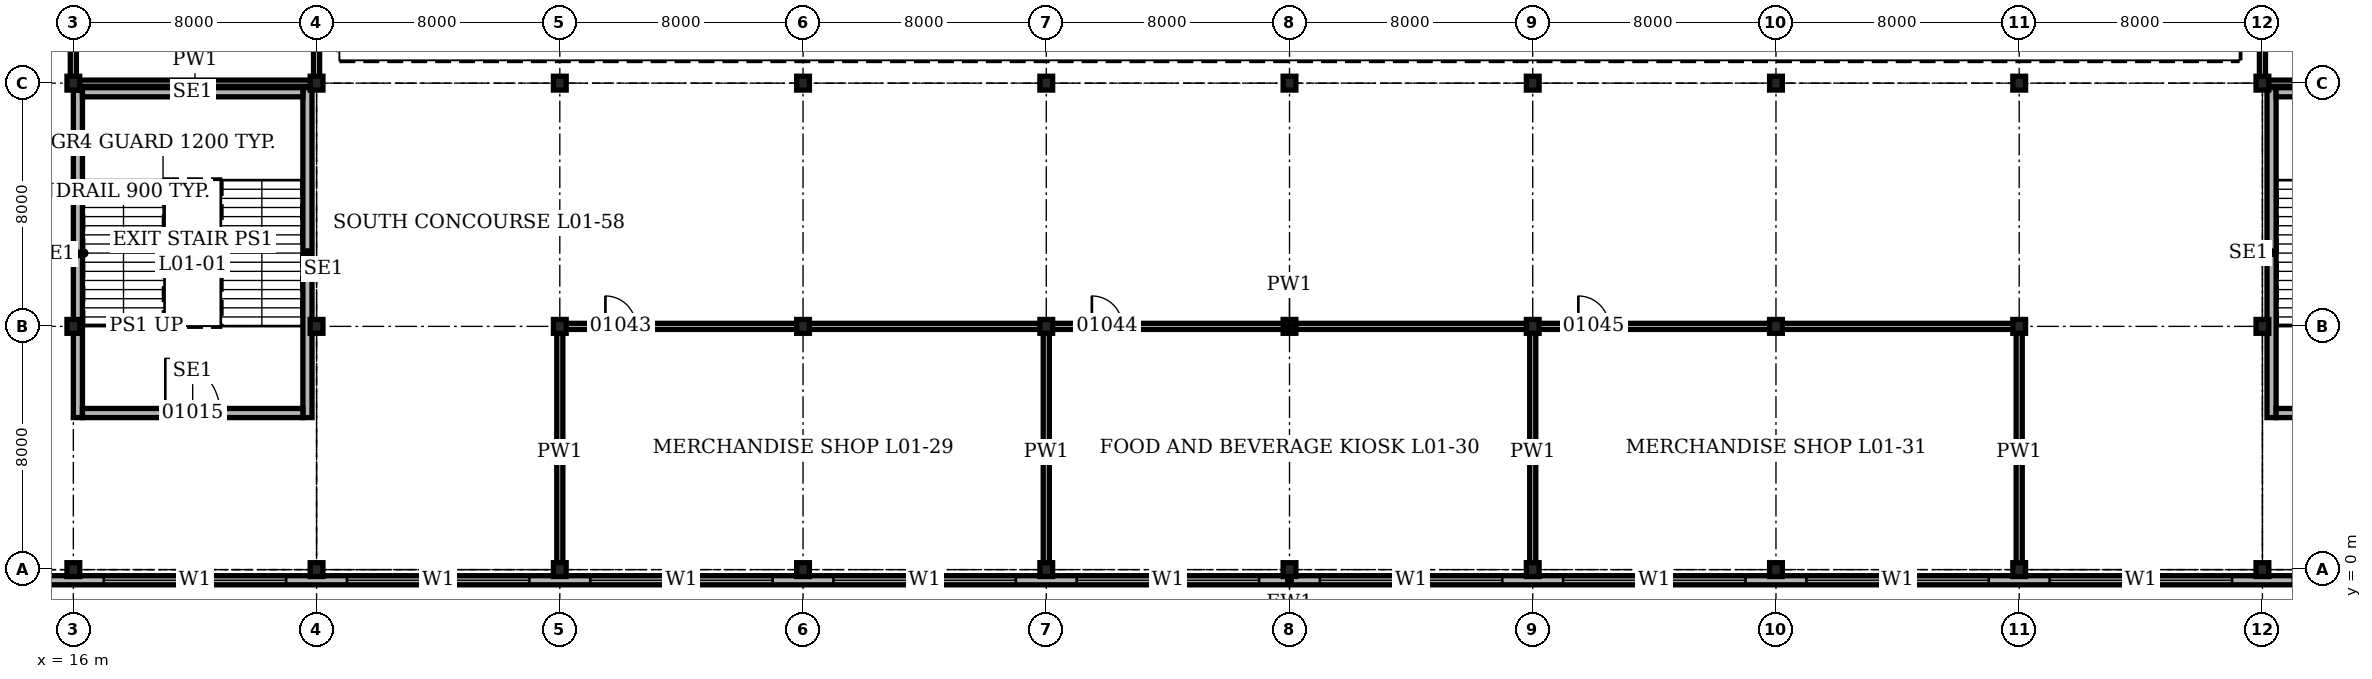
"""IFC4 building model, lengths in metres.
Left out: names, types, materials, properties, quantities, classifications, styles, units other than length and angle.
Written with IfcOpenShell. Run it as: python <this file> out.ifc"""

import sys

from ifc_helpers import new_model, si_unit, direction, frame, frame_2d, origin, origin_2d, place, context, subcontext, project, spatial, rectangle, i_section, extrude, element, fill, save


model = new_model("IFC4")
c1 = context("Model", 3, precision=1e-05, world=origin(), true_north=direction((0.0, 1.0)))
c2 = subcontext(c1, "Body", "Model", "MODEL_VIEW")
j1 = project(units=[si_unit("LENGTHUNIT", "METRE"), si_unit("PLANEANGLEUNIT", "RADIAN")], contexts=[c1])
p1 = place(None, origin())
s1 = spatial("IfcSite", under=j1, at=p1, CompositionType="ELEMENT")
p2 = place(p1, origin())
s2 = spatial("IfcBuilding", under=s1, at=p2, CompositionType="ELEMENT")
p3 = place(p2, frame((0.0, 0.0, 4.9)))
s3 = spatial("IfcBuildingStorey", under=s2, at=p3, CompositionType="ELEMENT", Elevation=4.9)
for number, where, z_axis, x_axis in (
    (1, (16.0, 0.0, 0.0), (0.0, 0.0, 1.0), (1.0, 0.0, 0.0)),
    (2, (16.0, 8.0, 0.0), (0.0, 0.0, 1.0), (1.0, 0.0, 0.0)),
    (3, (16.0, 16.0, 0.0), (0.0, 0.0, 1.0), (1.0, 0.0, 0.0)),
    (4, (24.0, 0.0, 0.0), (0.0, 0.0, 1.0), (1.0, 0.0, 0.0)),
    (5, (24.0, 8.0, 0.0), (0.0, 0.0, 1.0), (1.0, 0.0, 0.0)),
    (6, (24.0, 16.0, 0.0), (0.0, 0.0, 1.0), (1.0, 0.0, 0.0)),
    (7, (32.0, 0.0, 0.0), (0.0, 0.0, 1.0), (1.0, 0.0, 0.0)),
    (8, (32.0, 8.0, 0.0), (0.0, 0.0, 1.0), (1.0, 0.0, 0.0)),
    (9, (32.0, 16.0, 0.0), (0.0, 0.0, 1.0), (1.0, 0.0, 0.0)),
    (10, (40.0, 0.0, 0.0), (0.0, 0.0, 1.0), (1.0, 0.0, 0.0)),
    (11, (40.0, 8.0, 0.0), (0.0, 0.0, 1.0), (1.0, 0.0, 0.0)),
    (12, (40.0, 16.0, 0.0), (0.0, 0.0, 1.0), (1.0, 0.0, 0.0)),
    (13, (48.0, 0.0, 0.0), (0.0, 0.0, 1.0), (1.0, 0.0, 0.0)),
    (14, (48.0, 8.0, 0.0), (0.0, 0.0, 1.0), (1.0, 0.0, 0.0)),
    (15, (48.0, 16.0, 0.0), (0.0, 0.0, 1.0), (1.0, 0.0, 0.0)),
    (16, (56.0, 0.0, 0.0), (0.0, 0.0, 1.0), (1.0, 0.0, 0.0)),
    (17, (56.0, 8.0, 0.0), (0.0, 0.0, 1.0), (1.0, 0.0, 0.0)),
    (18, (56.0, 16.0, 0.0), (0.0, 0.0, 1.0), (1.0, 0.0, 0.0)),
    (19, (64.0, 0.0, 0.0), (0.0, 0.0, 1.0), (1.0, 0.0, 0.0)),
    (20, (64.0, 8.0, 0.0), (0.0, 0.0, 1.0), (1.0, 0.0, 0.0)),
    (21, (64.0, 16.0, 0.0), (0.0, 0.0, 1.0), (1.0, 0.0, 0.0)),
    (22, (72.0, 0.0, 0.0), (0.0, 0.0, 1.0), (1.0, 0.0, 0.0)),
    (23, (72.0, 8.0, 0.0), (0.0, 0.0, 1.0), (1.0, 0.0, 0.0)),
    (24, (72.0, 16.0, 0.0), (0.0, 0.0, 1.0), (1.0, 0.0, 0.0)),
    (25, (80.0, 0.0, 0.0), (0.0, 0.0, 1.0), (1.0, 0.0, 0.0)),
    (26, (80.0, 8.0, 0.0), (0.0, 0.0, 1.0), (1.0, 0.0, 0.0)),
    (27, (80.0, 16.0, 0.0), (0.0, 0.0, 1.0), (1.0, 0.0, 0.0)),
    (28, (88.0, 0.0, 0.0), (0.0, 0.0, 1.0), (1.0, 0.0, 0.0)),
    (29, (88.0, 8.0, 0.0), (0.0, 0.0, 1.0), (1.0, 0.0, 0.0)),
    (30, (88.0, 16.0, 0.0), (0.0, 0.0, 1.0), (1.0, 0.0, 0.0)),
):
    element("IfcColumn", number, at=place(p3, frame(where, z_axis=z_axis, x_axis=x_axis)), inside=s3, PredefinedType="COLUMN", context=c2, shape_type="SweptSolid", body=[
        extrude(i_section(OverallWidth=0.419, OverallDepth=0.455, WebThickness=0.042, FlangeThickness=0.068, at=origin_2d()), origin(), (0.0, 0.0, 1.0), 5.0),
    ])
p4 = place(p3, frame((-0.35, -0.35, 0.0), z_axis=(0.0, 0.0, 1.0), x_axis=(1.0, 0.0, 0.0)))
e31 = element("IfcWall", 31, at=p4, inside=s3, PredefinedType="SOLIDWALL", context=c2, shape_type="SweptSolid", body=[
    extrude(rectangle(XDim=112.7, YDim=0.3, at=frame_2d((56.35, 0.0))), origin(), (0.0, 0.0, 1.0), 5.0),
])
p5 = place(p4, frame((1.35, 0.0, 1.0)))
e32 = element("IfcOpeningElement", 32, at=p5, cuts=e31, PredefinedType="OPENING", context=c2, shape_type="SweptSolid", body=[
    extrude(rectangle(XDim=6.0, YDim=1.5, at=frame_2d((3.0, 0.75))), frame((0.0, 0.16, 0.0), z_axis=(0.0, -1.0, 0.0), x_axis=(1.0, 0.0, 0.0)), (0.0, 0.0, 1.0), 0.32),
])
p6 = place(p4, frame((9.35, 0.0, 1.0)))
e33 = element("IfcOpeningElement", 33, at=p6, cuts=e31, PredefinedType="OPENING", context=c2, shape_type="SweptSolid", body=[
    extrude(rectangle(XDim=6.0, YDim=1.5, at=frame_2d((3.0, 0.75))), frame((0.0, 0.16, 0.0), z_axis=(0.0, -1.0, 0.0), x_axis=(1.0, 0.0, 0.0)), (0.0, 0.0, 1.0), 0.32),
])
p7 = place(p4, frame((17.35, 0.0, 1.0)))
e34 = element("IfcOpeningElement", 34, at=p7, cuts=e31, PredefinedType="OPENING", context=c2, shape_type="SweptSolid", body=[
    extrude(rectangle(XDim=6.0, YDim=1.5, at=frame_2d((3.0, 0.75))), frame((0.0, 0.16, 0.0), z_axis=(0.0, -1.0, 0.0), x_axis=(1.0, 0.0, 0.0)), (0.0, 0.0, 1.0), 0.32),
])
p8 = place(p4, frame((25.35, 0.0, 1.0)))
e35 = element("IfcOpeningElement", 35, at=p8, cuts=e31, PredefinedType="OPENING", context=c2, shape_type="SweptSolid", body=[
    extrude(rectangle(XDim=6.0, YDim=1.5, at=frame_2d((3.0, 0.75))), frame((0.0, 0.16, 0.0), z_axis=(0.0, -1.0, 0.0), x_axis=(1.0, 0.0, 0.0)), (0.0, 0.0, 1.0), 0.32),
])
p9 = place(p4, frame((33.35, 0.0, 1.0)))
e36 = element("IfcOpeningElement", 36, at=p9, cuts=e31, PredefinedType="OPENING", context=c2, shape_type="SweptSolid", body=[
    extrude(rectangle(XDim=6.0, YDim=1.5, at=frame_2d((3.0, 0.75))), frame((0.0, 0.16, 0.0), z_axis=(0.0, -1.0, 0.0), x_axis=(1.0, 0.0, 0.0)), (0.0, 0.0, 1.0), 0.32),
])
p10 = place(p4, frame((41.35, 0.0, 1.0)))
e37 = element("IfcOpeningElement", 37, at=p10, cuts=e31, PredefinedType="OPENING", context=c2, shape_type="SweptSolid", body=[
    extrude(rectangle(XDim=6.0, YDim=1.5, at=frame_2d((3.0, 0.75))), frame((0.0, 0.16, 0.0), z_axis=(0.0, -1.0, 0.0), x_axis=(1.0, 0.0, 0.0)), (0.0, 0.0, 1.0), 0.32),
])
p11 = place(p4, frame((49.35, 0.0, 1.0)))
e38 = element("IfcOpeningElement", 38, at=p11, cuts=e31, PredefinedType="OPENING", context=c2, shape_type="SweptSolid", body=[
    extrude(rectangle(XDim=6.0, YDim=1.5, at=frame_2d((3.0, 0.75))), frame((0.0, 0.16, 0.0), z_axis=(0.0, -1.0, 0.0), x_axis=(1.0, 0.0, 0.0)), (0.0, 0.0, 1.0), 0.32),
])
p12 = place(p4, frame((57.35, 0.0, 1.0)))
e39 = element("IfcOpeningElement", 39, at=p12, cuts=e31, PredefinedType="OPENING", context=c2, shape_type="SweptSolid", body=[
    extrude(rectangle(XDim=6.0, YDim=1.5, at=frame_2d((3.0, 0.75))), frame((0.0, 0.16, 0.0), z_axis=(0.0, -1.0, 0.0), x_axis=(1.0, 0.0, 0.0)), (0.0, 0.0, 1.0), 0.32),
])
p13 = place(p4, frame((65.35, 0.0, 1.0)))
e40 = element("IfcOpeningElement", 40, at=p13, cuts=e31, PredefinedType="OPENING", context=c2, shape_type="SweptSolid", body=[
    extrude(rectangle(XDim=6.0, YDim=1.5, at=frame_2d((3.0, 0.75))), frame((0.0, 0.16, 0.0), z_axis=(0.0, -1.0, 0.0), x_axis=(1.0, 0.0, 0.0)), (0.0, 0.0, 1.0), 0.32),
])
p14 = place(p4, frame((73.35, 0.0, 1.0)))
e41 = element("IfcOpeningElement", 41, at=p14, cuts=e31, PredefinedType="OPENING", context=c2, shape_type="SweptSolid", body=[
    extrude(rectangle(XDim=6.0, YDim=1.5, at=frame_2d((3.0, 0.75))), frame((0.0, 0.16, 0.0), z_axis=(0.0, -1.0, 0.0), x_axis=(1.0, 0.0, 0.0)), (0.0, 0.0, 1.0), 0.32),
])
p15 = place(p4, frame((81.35, 0.0, 1.0)))
e42 = element("IfcOpeningElement", 42, at=p15, cuts=e31, PredefinedType="OPENING", context=c2, shape_type="SweptSolid", body=[
    extrude(rectangle(XDim=6.0, YDim=1.5, at=frame_2d((3.0, 0.75))), frame((0.0, 0.16, 0.0), z_axis=(0.0, -1.0, 0.0), x_axis=(1.0, 0.0, 0.0)), (0.0, 0.0, 1.0), 0.32),
])
p16 = place(p4, frame((89.35, 0.0, 1.0)))
e43 = element("IfcOpeningElement", 43, at=p16, cuts=e31, PredefinedType="OPENING", context=c2, shape_type="SweptSolid", body=[
    extrude(rectangle(XDim=6.0, YDim=1.5, at=frame_2d((3.0, 0.75))), frame((0.0, 0.16, 0.0), z_axis=(0.0, -1.0, 0.0), x_axis=(1.0, 0.0, 0.0)), (0.0, 0.0, 1.0), 0.32),
])
p17 = place(p4, frame((97.35, 0.0, 1.0)))
e44 = element("IfcOpeningElement", 44, at=p17, cuts=e31, PredefinedType="OPENING", context=c2, shape_type="SweptSolid", body=[
    extrude(rectangle(XDim=6.0, YDim=1.5, at=frame_2d((3.0, 0.75))), frame((0.0, 0.16, 0.0), z_axis=(0.0, -1.0, 0.0), x_axis=(1.0, 0.0, 0.0)), (0.0, 0.0, 1.0), 0.32),
])
p18 = place(p4, frame((105.35, 0.0, 1.0)))
e45 = element("IfcOpeningElement", 45, at=p18, cuts=e31, PredefinedType="OPENING", context=c2, shape_type="SweptSolid", body=[
    extrude(rectangle(XDim=6.0, YDim=1.5, at=frame_2d((3.0, 0.75))), frame((0.0, 0.16, 0.0), z_axis=(0.0, -1.0, 0.0), x_axis=(1.0, 0.0, 0.0)), (0.0, 0.0, 1.0), 0.32),
])
p19 = place(p3, frame((16.15, 5.0, 0.0), z_axis=(0.0, 0.0, 1.0), x_axis=(0.0, 1.0, 0.0)))
e46 = element("IfcWall", 46, at=p19, inside=s3, PredefinedType="SOLIDWALL", context=c2, shape_type="SweptSolid", body=[
    extrude(rectangle(XDim=10.773, YDim=0.3, at=frame_2d((5.386, 0.0))), origin(), (0.0, 0.0, 1.0), 4.8),
])
p20 = place(p3, frame((23.7, 5.0, 0.0), z_axis=(0.0, 0.0, 1.0), x_axis=(0.0, 1.0, 0.0)))
e47 = element("IfcWall", 47, at=p20, inside=s3, PredefinedType="SOLIDWALL", context=c2, shape_type="SweptSolid", body=[
    extrude(rectangle(XDim=10.85, YDim=0.3, at=frame_2d((5.425, 0.0))), origin(), (0.0, 0.0, 1.0), 4.8),
])
p21 = place(p3, frame((16.3, 5.15, 0.0), z_axis=(0.0, 0.0, 1.0), x_axis=(1.0, 0.0, 0.0)))
e48 = element("IfcWall", 48, at=p21, inside=s3, PredefinedType="SOLIDWALL", context=c2, shape_type="SweptSolid", body=[
    extrude(rectangle(XDim=7.25, YDim=0.3, at=frame_2d((3.625, 0.0))), origin(), (0.0, 0.0, 1.0), 4.8),
])
p22 = place(p21, frame((2.725, 0.0, 0.0)))
e49 = element("IfcOpeningElement", 49, at=p22, cuts=e48, PredefinedType="OPENING", context=c2, shape_type="SweptSolid", body=[
    extrude(rectangle(XDim=1.8, YDim=2.1, at=frame_2d((0.9, 1.05))), frame((0.0, 0.16, 0.0), z_axis=(0.0, -1.0, 0.0), x_axis=(1.0, 0.0, 0.0)), (0.0, 0.0, 1.0), 0.32),
])
p23 = place(p3, frame((16.3, 15.7, 0.0), z_axis=(0.0, 0.0, 1.0), x_axis=(1.0, 0.0, 0.0)))
e50 = element("IfcWall", 50, at=p23, inside=s3, PredefinedType="SOLIDWALL", context=c2, shape_type="SweptSolid", body=[
    extrude(rectangle(XDim=7.25, YDim=0.3, at=frame_2d((3.625, 0.0))), origin(), (0.0, 0.0, 1.0), 4.8),
])
p24 = place(p3, frame((88.3, 5.0, 0.0), z_axis=(0.0, 0.0, 1.0), x_axis=(0.0, 1.0, 0.0)))
e51 = element("IfcWall", 51, at=p24, inside=s3, PredefinedType="SOLIDWALL", context=c2, shape_type="SweptSolid", body=[
    extrude(rectangle(XDim=10.85, YDim=0.3, at=frame_2d((5.425, 0.0))), origin(), (0.0, 0.0, 1.0), 4.8),
])
p25 = place(p3, frame((88.45, 5.15, 0.0), z_axis=(0.0, 0.0, 1.0), x_axis=(1.0, 0.0, 0.0)))
e52 = element("IfcWall", 52, at=p25, inside=s3, PredefinedType="SOLIDWALL", context=c2, shape_type="SweptSolid", body=[
    extrude(rectangle(XDim=7.25, YDim=0.3, at=frame_2d((3.625, 0.0))), origin(), (0.0, 0.0, 1.0), 4.8),
])
p26 = place(p25, frame((2.725, 0.0, 0.0)))
e53 = element("IfcOpeningElement", 53, at=p26, cuts=e52, PredefinedType="OPENING", context=c2, shape_type="SweptSolid", body=[
    extrude(rectangle(XDim=1.8, YDim=2.1, at=frame_2d((0.9, 1.05))), frame((0.0, 0.16, 0.0), z_axis=(0.0, -1.0, 0.0), x_axis=(1.0, 0.0, 0.0)), (0.0, 0.0, 1.0), 0.32),
])
p27 = place(p3, frame((88.45, 15.7, 0.0), z_axis=(0.0, 0.0, 1.0), x_axis=(1.0, 0.0, 0.0)))
e54 = element("IfcWall", 54, at=p27, inside=s3, PredefinedType="SOLIDWALL", context=c2, shape_type="SweptSolid", body=[
    extrude(rectangle(XDim=7.25, YDim=0.3, at=frame_2d((3.625, 0.0))), origin(), (0.0, 0.0, 1.0), 4.8),
])
p28 = place(p3, frame((32.1, 8.0, 0.0), z_axis=(0.0, 0.0, 1.0), x_axis=(1.0, 0.0, 0.0)))
e55 = element("IfcWall", 55, at=p28, inside=s3, PredefinedType="PARTITIONING", context=c2, shape_type="SweptSolid", body=[
    extrude(rectangle(XDim=47.8, YDim=0.2, at=frame_2d((23.9, 0.0))), origin(), (0.0, 0.0, 1.0), 4.028),
])
p29 = place(p28, frame((1.4, 0.0, 0.0)))
e56 = element("IfcOpeningElement", 56, at=p29, cuts=e55, PredefinedType="OPENING", context=c2, shape_type="SweptSolid", body=[
    extrude(rectangle(XDim=1.0, YDim=2.1, at=frame_2d((0.5, 1.05))), frame((0.0, 0.11, 0.0), z_axis=(0.0, -1.0, 0.0), x_axis=(1.0, 0.0, 0.0)), (0.0, 0.0, 1.0), 0.22),
])
p30 = place(p28, frame((17.4, 0.0, 0.0)))
e57 = element("IfcOpeningElement", 57, at=p30, cuts=e55, PredefinedType="OPENING", context=c2, shape_type="SweptSolid", body=[
    extrude(rectangle(XDim=1.0, YDim=2.1, at=frame_2d((0.5, 1.05))), frame((0.0, 0.11, 0.0), z_axis=(0.0, -1.0, 0.0), x_axis=(1.0, 0.0, 0.0)), (0.0, 0.0, 1.0), 0.22),
])
p31 = place(p28, frame((33.4, 0.0, 0.0)))
e58 = element("IfcOpeningElement", 58, at=p31, cuts=e55, PredefinedType="OPENING", context=c2, shape_type="SweptSolid", body=[
    extrude(rectangle(XDim=1.0, YDim=2.1, at=frame_2d((0.5, 1.05))), frame((0.0, 0.11, 0.0), z_axis=(0.0, -1.0, 0.0), x_axis=(1.0, 0.0, 0.0)), (0.0, 0.0, 1.0), 0.22),
])
for number, where, z_axis, x_axis in (
    (59, (16.1, 16.0, 0.0), (0.0, 0.0, 1.0), (1.0, 0.0, 0.0)),
    (60, (88.1, 16.0, 0.0), (0.0, 0.0, 1.0), (1.0, 0.0, 0.0)),
):
    element("IfcWall", number, at=place(p3, frame(where, z_axis=z_axis, x_axis=x_axis)), inside=s3, PredefinedType="PARTITIONING", context=c2, shape_type="SweptSolid", body=[
        extrude(rectangle(XDim=7.8, YDim=0.2, at=frame_2d((3.9, 0.0))), origin(), (0.0, 0.0, 1.0), 4.028),
    ])
p32 = place(p3, frame((16.0, 16.1, 0.0), z_axis=(0.0, 0.0, 1.0), x_axis=(0.0, 1.0, 0.0)))
e61 = element("IfcWall", 61, at=p32, inside=s3, PredefinedType="PARTITIONING", context=c2, shape_type="SweptSolid", body=[
    extrude(rectangle(XDim=7.8, YDim=0.2, at=frame_2d((3.9, 0.0))), origin(), (0.0, 0.0, 1.0), 4.028),
])
p33 = place(p32, frame((1.4, 0.0, 0.0)))
e62 = element("IfcOpeningElement", 62, at=p33, cuts=e61, PredefinedType="OPENING", context=c2, shape_type="SweptSolid", body=[
    extrude(rectangle(XDim=1.0, YDim=2.1, at=frame_2d((0.5, 1.05))), frame((0.0, 0.11, 0.0), z_axis=(0.0, -1.0, 0.0), x_axis=(1.0, 0.0, 0.0)), (0.0, 0.0, 1.0), 0.22),
])
p34 = place(p3, frame((24.0, 16.1, 0.0), z_axis=(0.0, 0.0, 1.0), x_axis=(0.0, 1.0, 0.0)))
e63 = element("IfcWall", 63, at=p34, inside=s3, PredefinedType="PARTITIONING", context=c2, shape_type="SweptSolid", body=[
    extrude(rectangle(XDim=7.8, YDim=0.2, at=frame_2d((3.9, 0.0))), origin(), (0.0, 0.0, 1.0), 4.028),
])
for number, where, z_axis, x_axis in (
    (64, (32.0, -0.15, 0.0), (0.0, 0.0, 1.0), (0.0, 1.0, 0.0)),
    (65, (48.0, -0.15, 0.0), (0.0, 0.0, 1.0), (0.0, 1.0, 0.0)),
    (66, (64.0, -0.15, 0.0), (0.0, 0.0, 1.0), (0.0, 1.0, 0.0)),
    (67, (80.0, -0.15, 0.0), (0.0, 0.0, 1.0), (0.0, 1.0, 0.0)),
):
    element("IfcWall", number, at=place(p3, frame(where, z_axis=z_axis, x_axis=x_axis)), inside=s3, PredefinedType="PARTITIONING", context=c2, shape_type="SweptSolid", body=[
        extrude(rectangle(XDim=8.05, YDim=0.2, at=frame_2d((4.025, 0.0))), origin(), (0.0, 0.0, 1.0), 4.028),
    ])
p35 = place(p3, frame((88.0, 16.1, 0.0), z_axis=(0.0, 0.0, 1.0), x_axis=(0.0, 1.0, 0.0)))
e68 = element("IfcWall", 68, at=p35, inside=s3, PredefinedType="PARTITIONING", context=c2, shape_type="SweptSolid", body=[
    extrude(rectangle(XDim=7.8, YDim=0.2, at=frame_2d((3.9, 0.0))), origin(), (0.0, 0.0, 1.0), 4.028),
])
p36 = place(p7, origin())
e69 = element("IfcWindow", 69, at=p36, inside=s3, PartitioningType="SINGLE_PANEL", PredefinedType="WINDOW", context=c2, shape_type="SweptSolid", body=[
    extrude(rectangle(XDim=6.0, YDim=1.5, at=frame_2d((3.0, 0.75))), frame((0.0, 0.03, 0.0), z_axis=(0.0, -1.0, 0.0), x_axis=(1.0, 0.0, 0.0)), (0.0, 0.0, 1.0), 0.06),
])
fill(e34, e69)
p37 = place(p8, origin())
e70 = element("IfcWindow", 70, at=p37, inside=s3, PartitioningType="SINGLE_PANEL", PredefinedType="WINDOW", context=c2, shape_type="SweptSolid", body=[
    extrude(rectangle(XDim=6.0, YDim=1.5, at=frame_2d((3.0, 0.75))), frame((0.0, 0.03, 0.0), z_axis=(0.0, -1.0, 0.0), x_axis=(1.0, 0.0, 0.0)), (0.0, 0.0, 1.0), 0.06),
])
fill(e35, e70)
p38 = place(p9, origin())
e71 = element("IfcWindow", 71, at=p38, inside=s3, PartitioningType="SINGLE_PANEL", PredefinedType="WINDOW", context=c2, shape_type="SweptSolid", body=[
    extrude(rectangle(XDim=6.0, YDim=1.5, at=frame_2d((3.0, 0.75))), frame((0.0, 0.03, 0.0), z_axis=(0.0, -1.0, 0.0), x_axis=(1.0, 0.0, 0.0)), (0.0, 0.0, 1.0), 0.06),
])
fill(e36, e71)
p39 = place(p10, origin())
e72 = element("IfcWindow", 72, at=p39, inside=s3, PartitioningType="SINGLE_PANEL", PredefinedType="WINDOW", context=c2, shape_type="SweptSolid", body=[
    extrude(rectangle(XDim=6.0, YDim=1.5, at=frame_2d((3.0, 0.75))), frame((0.0, 0.03, 0.0), z_axis=(0.0, -1.0, 0.0), x_axis=(1.0, 0.0, 0.0)), (0.0, 0.0, 1.0), 0.06),
])
fill(e37, e72)
p40 = place(p11, origin())
e73 = element("IfcWindow", 73, at=p40, inside=s3, PartitioningType="SINGLE_PANEL", PredefinedType="WINDOW", context=c2, shape_type="SweptSolid", body=[
    extrude(rectangle(XDim=6.0, YDim=1.5, at=frame_2d((3.0, 0.75))), frame((0.0, 0.03, 0.0), z_axis=(0.0, -1.0, 0.0), x_axis=(1.0, 0.0, 0.0)), (0.0, 0.0, 1.0), 0.06),
])
fill(e38, e73)
p41 = place(p12, origin())
e74 = element("IfcWindow", 74, at=p41, inside=s3, PartitioningType="SINGLE_PANEL", PredefinedType="WINDOW", context=c2, shape_type="SweptSolid", body=[
    extrude(rectangle(XDim=6.0, YDim=1.5, at=frame_2d((3.0, 0.75))), frame((0.0, 0.03, 0.0), z_axis=(0.0, -1.0, 0.0), x_axis=(1.0, 0.0, 0.0)), (0.0, 0.0, 1.0), 0.06),
])
fill(e39, e74)
p42 = place(p13, origin())
e75 = element("IfcWindow", 75, at=p42, inside=s3, PartitioningType="SINGLE_PANEL", PredefinedType="WINDOW", context=c2, shape_type="SweptSolid", body=[
    extrude(rectangle(XDim=6.0, YDim=1.5, at=frame_2d((3.0, 0.75))), frame((0.0, 0.03, 0.0), z_axis=(0.0, -1.0, 0.0), x_axis=(1.0, 0.0, 0.0)), (0.0, 0.0, 1.0), 0.06),
])
fill(e40, e75)
p43 = place(p14, origin())
e76 = element("IfcWindow", 76, at=p43, inside=s3, PartitioningType="SINGLE_PANEL", PredefinedType="WINDOW", context=c2, shape_type="SweptSolid", body=[
    extrude(rectangle(XDim=6.0, YDim=1.5, at=frame_2d((3.0, 0.75))), frame((0.0, 0.03, 0.0), z_axis=(0.0, -1.0, 0.0), x_axis=(1.0, 0.0, 0.0)), (0.0, 0.0, 1.0), 0.06),
])
fill(e41, e76)
p44 = place(p15, origin())
e77 = element("IfcWindow", 77, at=p44, inside=s3, PartitioningType="SINGLE_PANEL", PredefinedType="WINDOW", context=c2, shape_type="SweptSolid", body=[
    extrude(rectangle(XDim=6.0, YDim=1.5, at=frame_2d((3.0, 0.75))), frame((0.0, 0.03, 0.0), z_axis=(0.0, -1.0, 0.0), x_axis=(1.0, 0.0, 0.0)), (0.0, 0.0, 1.0), 0.06),
])
fill(e42, e77)
p45 = place(p22, origin())
e78 = element("IfcDoor", 78, at=p45, inside=s3, OperationType="DOUBLE_DOOR_SINGLE_SWING", PredefinedType="DOOR", context=c2, shape_type="SweptSolid", body=[
    extrude(rectangle(XDim=1.8, YDim=2.1, at=frame_2d((0.9, 1.05))), frame((0.0, 0.15, 0.0), z_axis=(0.0, -1.0, 0.0), x_axis=(1.0, 0.0, 0.0)), (0.0, 0.0, 1.0), 0.3),
])
fill(e49, e78)
p46 = place(p29, origin())
e79 = element("IfcDoor", 79, at=p46, inside=s3, OperationType="SINGLE_SWING_LEFT", PredefinedType="DOOR", context=c2, shape_type="SweptSolid", body=[
    extrude(rectangle(XDim=1.0, YDim=2.1, at=frame_2d((0.5, 1.05))), frame((0.0, 0.1, 0.0), z_axis=(0.0, -1.0, 0.0), x_axis=(1.0, 0.0, 0.0)), (0.0, 0.0, 1.0), 0.199),
])
fill(e56, e79)
p47 = place(p30, origin())
e80 = element("IfcDoor", 80, at=p47, inside=s3, OperationType="SINGLE_SWING_LEFT", PredefinedType="DOOR", context=c2, shape_type="SweptSolid", body=[
    extrude(rectangle(XDim=1.0, YDim=2.1, at=frame_2d((0.5, 1.05))), frame((0.0, 0.1, 0.0), z_axis=(0.0, -1.0, 0.0), x_axis=(1.0, 0.0, 0.0)), (0.0, 0.0, 1.0), 0.199),
])
fill(e57, e80)
p48 = place(p31, origin())
e81 = element("IfcDoor", 81, at=p48, inside=s3, OperationType="SINGLE_SWING_LEFT", PredefinedType="DOOR", context=c2, shape_type="SweptSolid", body=[
    extrude(rectangle(XDim=1.0, YDim=2.1, at=frame_2d((0.5, 1.05))), frame((0.0, 0.1, 0.0), z_axis=(0.0, -1.0, 0.0), x_axis=(1.0, 0.0, 0.0)), (0.0, 0.0, 1.0), 0.199),
])
fill(e58, e81)
save(model, sys.argv[1])
